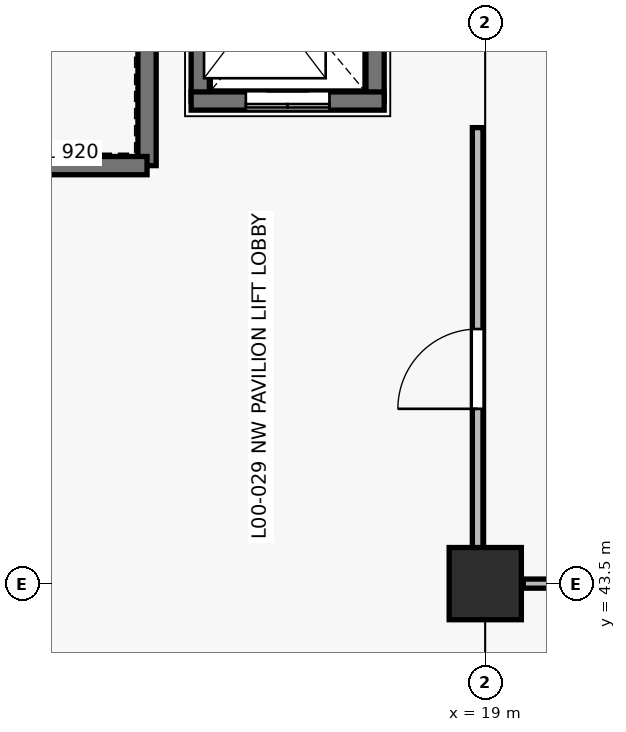
"""IFC4 building model, lengths in metres.
Left out: names, types, materials, properties, quantities, classifications, styles, units other than length and angle.
Written with IfcOpenShell. Run it as: python <this file> out.ifc"""

import sys

from ifc_helpers import new_model, si_unit, direction, frame, frame_2d, origin, origin_2d, place, context, subcontext, project, spatial, rectangle, extrude, element, fill, save


model = new_model("IFC4")
c1 = context("Model", 3, precision=1e-05, world=origin(), true_north=direction((0.0, 1.0)))
c2 = subcontext(c1, "Body", "Model", "MODEL_VIEW")
j1 = project(units=[si_unit("LENGTHUNIT", "METRE"), si_unit("PLANEANGLEUNIT", "RADIAN")], contexts=[c1])
p1 = place(None, origin())
s1 = spatial("IfcSite", under=j1, at=p1, CompositionType="ELEMENT")
p2 = place(p1, origin())
s2 = spatial("IfcBuilding", under=s1, at=p2, CompositionType="ELEMENT")
p3 = place(p2, origin())
s3 = spatial("IfcBuildingStorey", under=s2, at=p3, CompositionType="ELEMENT", Elevation=0.0)
p4 = place(p3, frame((19.0, 43.5, 0.0), z_axis=(0.0, 0.0, 1.0), x_axis=(1.0, 0.0, 0.0)))
e1 = element("IfcColumn", 1, at=p4, inside=s3, PredefinedType="COLUMN", context=c2, shape_type="SweptSolid", body=[
    extrude(rectangle(XDim=0.95, YDim=0.95, at=origin_2d()), origin(), (0.0, 0.0, 1.0), 4.8),
])
p5 = place(p3, frame((15.25, 49.85, -1.3), z_axis=(0.0, 0.0, 1.0), x_axis=(0.0, 1.0, 0.0)))
e2 = element("IfcWall", 2, at=p5, inside=s3, PredefinedType="SHEAR", context=c2, shape_type="SweptSolid", body=[
    extrude(rectangle(XDim=2.7, YDim=0.24, at=frame_2d((1.35, 0.0))), origin(), (0.0, 0.0, 1.0), 6.1),
])
p6 = place(p3, frame((17.55, 52.55, 0.0), z_axis=(0.0, 0.0, 1.0), x_axis=(0.0, -1.0, 0.0)))
e3 = element("IfcWall", 3, at=p6, inside=s3, PredefinedType="SHEAR", context=c2, shape_type="SweptSolid", body=[
    extrude(rectangle(XDim=2.7, YDim=0.24, at=frame_2d((1.35, 0.0))), origin(), (0.0, 0.0, 1.0), 4.8),
])
p7 = place(p3, frame((17.67, 49.85, 0.0), z_axis=(0.0, 0.0, 1.0), x_axis=(-1.0, 0.0, 0.0)))
e4 = element("IfcWall", 4, at=p7, inside=s3, PredefinedType="SHEAR", context=c2, shape_type="SweptSolid", body=[
    extrude(rectangle(XDim=2.54, YDim=0.24, at=frame_2d((1.27, 0.0))), origin(), (0.0, 0.0, 1.0), 4.8),
])
p8 = place(p7, frame((0.72, 0.0, 0.0)))
e5 = element("IfcOpeningElement", 5, at=p8, cuts=e4, PredefinedType="OPENING", context=c2, shape_type="SweptSolid", body=[
    extrude(rectangle(XDim=1.1, YDim=2.15, at=frame_2d((0.55, 1.075))), frame((0.0, 0.13, 0.0), z_axis=(0.0, -1.0, 0.0), x_axis=(1.0, 0.0, 0.0)), (0.0, 0.0, 1.0), 0.26),
])
p9 = place(p3, frame((14.55, 49.0, 0.0), z_axis=(0.0, 0.0, 1.0), x_axis=(0.0, 1.0, 0.0)))
e6 = element("IfcWall", 6, at=p9, inside=s3, PredefinedType="SHEAR", context=c2, shape_type="SweptSolid", body=[
    extrude(rectangle(XDim=4.0, YDim=0.24, at=frame_2d((2.0, 0.0))), origin(), (0.0, 0.0, 1.0), 4.8),
])
p10 = place(p3, frame((7.45, 49.0, 0.0), z_axis=(0.0, 0.0, 1.0), x_axis=(1.0, 0.0, 0.0)))
e7 = element("IfcWall", 7, at=p10, inside=s3, PredefinedType="SHEAR", context=c2, shape_type="SweptSolid", body=[
    extrude(rectangle(XDim=7.1, YDim=0.24, at=frame_2d((3.55, 0.0))), origin(), (0.0, 0.0, 1.0), 4.8),
])
p11 = place(p10, frame((0.18, 0.0, 0.0)))
e8 = element("IfcOpeningElement", 8, at=p11, cuts=e7, PredefinedType="OPENING", context=c2, shape_type="SweptSolid", body=[
    extrude(rectangle(XDim=1.0, YDim=2.15, at=frame_2d((0.5, 1.075))), frame((0.0, 0.13, 0.0), z_axis=(0.0, -1.0, 0.0), x_axis=(1.0, 0.0, 0.0)), (0.0, 0.0, 1.0), 0.26),
])
p12 = place(p3, frame((18.9, 43.6, 0.0), z_axis=(0.0, 0.0, 1.0), x_axis=(0.0, 1.0, 0.0)))
e9 = element("IfcWall", 9, at=p12, inside=s3, PredefinedType="PARTITIONING", context=c2, shape_type="SweptSolid", body=[
    extrude(rectangle(XDim=5.9, YDim=0.14, at=frame_2d((2.95, 0.0))), origin(), (0.0, 0.0, 1.0), 3.645),
])
p13 = place(p12, frame((2.2, 0.0, 0.0)))
e10 = element("IfcOpeningElement", 10, at=p13, cuts=e9, PredefinedType="OPENING", context=c2, shape_type="SweptSolid", body=[
    extrude(rectangle(XDim=1.05, YDim=2.1, at=frame_2d((0.525, 1.05))), frame((0.0, 0.08, 0.0), z_axis=(0.0, -1.0, 0.0), x_axis=(1.0, 0.0, 0.0)), (0.0, 0.0, 1.0), 0.16),
])
p14 = place(p3, frame((19.5, 43.5, 0.0), z_axis=(0.0, 0.0, 1.0), x_axis=(1.0, 0.0, 0.0)))
e11 = element("IfcWall", 11, at=p14, inside=s3, PredefinedType="PARTITIONING", context=c2, shape_type="SweptSolid", body=[
    extrude(rectangle(XDim=35.0, YDim=0.12, at=frame_2d((17.5, 0.0))), origin(), (0.0, 0.0, 1.0), 3.645),
])
p15 = place(p14, frame((5.4, 0.0, 0.0)))
e12 = element("IfcOpeningElement", 12, at=p15, cuts=e11, PredefinedType="OPENING", context=c2, shape_type="SweptSolid", body=[
    extrude(rectangle(XDim=1.25, YDim=2.2, at=frame_2d((0.625, 1.1))), frame((0.0, 0.07, 0.0), z_axis=(0.0, -1.0, 0.0), x_axis=(1.0, 0.0, 0.0)), (0.0, 0.0, 1.0), 0.14),
])
p16 = place(p8, origin())
e13 = element("IfcDoor", 13, at=p16, inside=s3, OperationType="DOUBLE_DOOR_SLIDING", PredefinedType="USERDEFINED", context=c2, shape_type="SweptSolid", body=[
    extrude(rectangle(XDim=1.1, YDim=2.15, at=frame_2d((0.55, 1.075))), frame((0.0, 0.025, 0.0), z_axis=(0.0, -1.0, 0.0), x_axis=(1.0, 0.0, 0.0)), (0.0, 0.0, 1.0), 0.05),
])
fill(e5, e13)
p17 = place(p13, origin())
e14 = element("IfcDoor", 14, at=p17, inside=s3, OperationType="SINGLE_SWING_LEFT", PredefinedType="DOOR", context=c2, shape_type="SweptSolid", body=[
    extrude(rectangle(XDim=1.05, YDim=2.1, at=frame_2d((0.525, 1.05))), frame((0.0, 0.025, 0.0), z_axis=(0.0, -1.0, 0.0), x_axis=(1.0, 0.0, 0.0)), (0.0, 0.0, 1.0), 0.05),
])
fill(e10, e14)
save(model, sys.argv[1])
